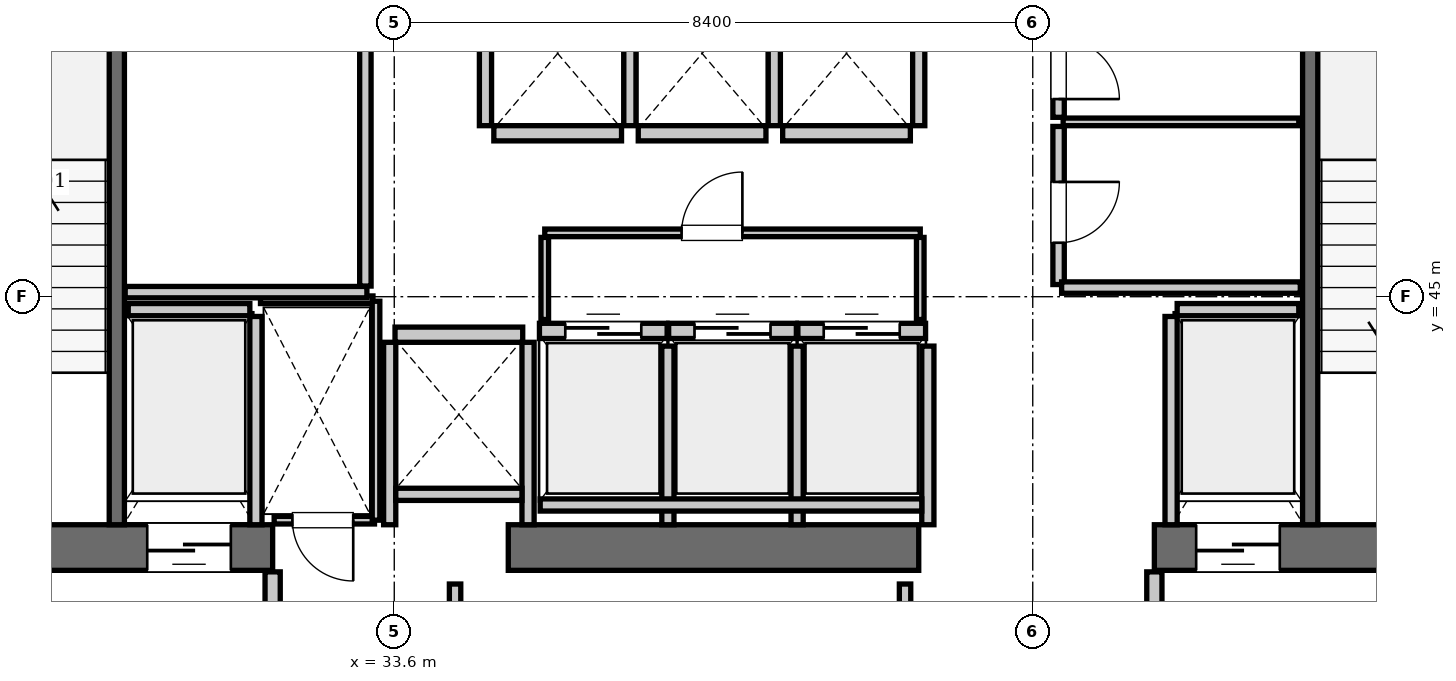
"""IFC4 building model, lengths in metres.
Left out: names, types, materials, properties, quantities, classifications, styles, units other than length and angle.
Written with IfcOpenShell. Run it as: python <this file> out.ifc"""

import sys

from ifc_helpers import new_model, si_unit, direction, frame, frame_2d, origin, place, context, subcontext, project, spatial, rectangle, extrude, element, fill, save


model = new_model("IFC4")
c1 = context("Model", 3, precision=1e-05, world=origin(), true_north=direction((0.0, 1.0)))
c2 = subcontext(c1, "Body", "Model", "MODEL_VIEW")
j1 = project(units=[si_unit("LENGTHUNIT", "METRE"), si_unit("PLANEANGLEUNIT", "RADIAN")], contexts=[c1])
p1 = place(None, origin())
s1 = spatial("IfcSite", under=j1, at=p1, CompositionType="ELEMENT")
p2 = place(p1, origin())
s2 = spatial("IfcBuilding", under=s1, at=p2, CompositionType="ELEMENT")
p3 = place(p2, frame((0.0, 0.0, 304.85)))
s3 = spatial("IfcBuildingStorey", under=s2, at=p3, CompositionType="ELEMENT", Elevation=304.85)
p4 = place(p3, frame((25.2, 41.7, 0.0), z_axis=(0.0, 0.0, 1.0), x_axis=(1.0, 0.0, 0.0)))
e1 = element("IfcWall", 1, at=p4, inside=s3, PredefinedType="SHEAR", context=c2, shape_type="SweptSolid", body=[
    extrude(rectangle(XDim=6.8, YDim=0.6, at=frame_2d((3.4, 0.0))), origin(), (0.0, 0.0, 1.0), 3.85),
])
p5 = place(p4, frame((1.65, 0.0, 0.0)))
e2 = element("IfcOpeningElement", 2, at=p5, cuts=e1, PredefinedType="OPENING", context=c2, shape_type="SweptSolid", body=[
    extrude(rectangle(XDim=1.15, YDim=2.15, at=frame_2d((0.575, 1.075))), frame((0.0, 0.31, 0.0), z_axis=(0.0, -1.0, 0.0), x_axis=(1.0, 0.0, 0.0)), (0.0, 0.0, 1.0), 0.62),
])
p6 = place(p4, frame((5.15, 0.0, 0.0)))
e3 = element("IfcOpeningElement", 3, at=p6, cuts=e1, PredefinedType="OPENING", context=c2, shape_type="SweptSolid", body=[
    extrude(rectangle(XDim=1.1, YDim=2.2, at=frame_2d((0.55, 1.1))), frame((0.0, 0.31, 0.0), z_axis=(0.0, -1.0, 0.0), x_axis=(1.0, 0.0, 0.0)), (0.0, 0.0, 1.0), 0.62),
])
p7 = place(p3, frame((35.1, 41.7, 0.0), z_axis=(0.0, 0.0, 1.0), x_axis=(1.0, 0.0, 0.0)))
e4 = element("IfcWall", 4, at=p7, inside=s3, PredefinedType="SHEAR", context=c2, shape_type="SweptSolid", body=[
    extrude(rectangle(XDim=5.4, YDim=0.6, at=frame_2d((2.7, 0.0))), origin(), (0.0, 0.0, 1.0), 3.85),
])
p8 = place(p3, frame((43.6, 41.7, 0.0), z_axis=(0.0, 0.0, 1.0), x_axis=(1.0, 0.0, 0.0)))
e5 = element("IfcWall", 5, at=p8, inside=s3, PredefinedType="SHEAR", context=c2, shape_type="SweptSolid", body=[
    extrude(rectangle(XDim=6.8, YDim=0.6, at=frame_2d((3.4, 0.0))), origin(), (0.0, 0.0, 1.0), 3.85),
])
p9 = place(p8, frame((3.9, 0.0, 0.0)))
e6 = element("IfcOpeningElement", 6, at=p9, cuts=e5, PredefinedType="OPENING", context=c2, shape_type="SweptSolid", body=[
    extrude(rectangle(XDim=1.15, YDim=2.15, at=frame_2d((0.575, 1.075))), frame((0.0, 0.31, 0.0), z_axis=(0.0, -1.0, 0.0), x_axis=(1.0, 0.0, 0.0)), (0.0, 0.0, 1.0), 0.62),
])
p10 = place(p8, frame((0.55, 0.0, 0.0)))
e7 = element("IfcOpeningElement", 7, at=p10, cuts=e5, PredefinedType="OPENING", context=c2, shape_type="SweptSolid", body=[
    extrude(rectangle(XDim=1.1, YDim=2.2, at=frame_2d((0.55, 1.1))), frame((0.0, 0.31, 0.0), z_axis=(0.0, -1.0, 0.0), x_axis=(1.0, 0.0, 0.0)), (0.0, 0.0, 1.0), 0.62),
])
for number, where, z_axis, x_axis in (
    (8, (29.95, 42.0, 0.0), (0.0, 0.0, 1.0), (0.0, 1.0, 0.0)),
    (9, (45.65, 42.0, 0.0), (0.0, 0.0, 1.0), (0.0, 1.0, 0.0)),
):
    element("IfcWall", number, at=place(p3, frame(where, z_axis=z_axis, x_axis=x_axis)), inside=s3, PredefinedType="SOLIDWALL", context=c2, shape_type="SweptSolid", body=[
        extrude(rectangle(XDim=9.15, YDim=0.2, at=frame_2d((4.575, 0.0))), origin(), (0.0, 0.0, 1.0), 3.61),
    ])
p11 = place(p3, frame((35.51, 44.55, 0.0), z_axis=(0.0, 0.0, 1.0), x_axis=(1.0, 0.0, 0.0)))
e10 = element("IfcWall", 10, at=p11, inside=s3, PredefinedType="SOLIDWALL", context=c2, shape_type="SweptSolid", body=[
    extrude(rectangle(XDim=1.68, YDim=0.2, at=frame_2d((0.84, 0.0))), origin(), (0.0, 0.0, 1.0), 3.61),
])
p12 = place(p11, frame((0.34, 0.0, 0.0)))
e11 = element("IfcOpeningElement", 11, at=p12, cuts=e10, PredefinedType="OPENING", context=c2, shape_type="SweptSolid", body=[
    extrude(rectangle(XDim=1.0, YDim=2.15, at=frame_2d((0.5, 1.075))), frame((0.0, 0.11, 0.0), z_axis=(0.0, -1.0, 0.0), x_axis=(1.0, 0.0, 0.0)), (0.0, 0.0, 1.0), 0.22),
])
p13 = place(p3, frame((37.21, 44.55, 0.0), z_axis=(0.0, 0.0, 1.0), x_axis=(1.0, 0.0, 0.0)))
e12 = element("IfcWall", 12, at=p13, inside=s3, PredefinedType="SOLIDWALL", context=c2, shape_type="SweptSolid", body=[
    extrude(rectangle(XDim=1.68, YDim=0.2, at=frame_2d((0.84, 0.0))), origin(), (0.0, 0.0, 1.0), 3.61),
])
p14 = place(p13, frame((0.34, 0.0, 0.0)))
e13 = element("IfcOpeningElement", 13, at=p14, cuts=e12, PredefinedType="OPENING", context=c2, shape_type="SweptSolid", body=[
    extrude(rectangle(XDim=1.0, YDim=2.15, at=frame_2d((0.5, 1.075))), frame((0.0, 0.11, 0.0), z_axis=(0.0, -1.0, 0.0), x_axis=(1.0, 0.0, 0.0)), (0.0, 0.0, 1.0), 0.22),
])
p15 = place(p3, frame((38.91, 44.55, 0.0), z_axis=(0.0, 0.0, 1.0), x_axis=(1.0, 0.0, 0.0)))
e14 = element("IfcWall", 14, at=p15, inside=s3, PredefinedType="SOLIDWALL", context=c2, shape_type="SweptSolid", body=[
    extrude(rectangle(XDim=1.68, YDim=0.2, at=frame_2d((0.84, 0.0))), origin(), (0.0, 0.0, 1.0), 3.61),
])
p16 = place(p15, frame((0.34, 0.0, 0.0)))
e15 = element("IfcOpeningElement", 15, at=p16, cuts=e14, PredefinedType="OPENING", context=c2, shape_type="SweptSolid", body=[
    extrude(rectangle(XDim=1.0, YDim=2.15, at=frame_2d((0.5, 1.075))), frame((0.0, 0.11, 0.0), z_axis=(0.0, -1.0, 0.0), x_axis=(1.0, 0.0, 0.0)), (0.0, 0.0, 1.0), 0.22),
])
p17 = place(p3, frame((34.91, 47.15, 0.0), z_axis=(0.0, 0.0, 1.0), x_axis=(1.0, 0.0, 0.0)))
e16 = element("IfcWall", 16, at=p17, inside=s3, PredefinedType="SOLIDWALL", context=c2, shape_type="SweptSolid", body=[
    extrude(rectangle(XDim=1.68, YDim=0.2, at=frame_2d((0.84, 0.0))), origin(), (0.0, 0.0, 1.0), 3.61),
])
for number, where, z_axis, x_axis in (
    (17, (36.81, 47.15, 0.0), (0.0, 0.0, 1.0), (1.0, 0.0, 0.0)),
    (18, (38.71, 47.15, 0.0), (0.0, 0.0, 1.0), (1.0, 0.0, 0.0)),
    (19, (33.61, 44.5, 0.0), (0.0, 0.0, 1.0), (1.0, 0.0, 0.0)),
):
    element("IfcWall", number, at=place(p3, frame(where, z_axis=z_axis, x_axis=x_axis)), inside=s3, PredefinedType="SOLIDWALL", context=c2, shape_type="SweptSolid", body=[
        extrude(rectangle(XDim=1.68, YDim=0.2, at=frame_2d((0.84, 0.0))), origin(), (0.0, 0.0, 1.0), 3.61),
    ])
p18 = place(p3, frame((30.1, 44.83, 0.0), z_axis=(0.0, 0.0, 1.0), x_axis=(1.0, 0.0, 0.0)))
e20 = element("IfcWall", 20, at=p18, inside=s3, PredefinedType="SOLIDWALL", context=c2, shape_type="SweptSolid", body=[
    extrude(rectangle(XDim=1.6, YDim=0.16, at=frame_2d((0.8, 0.0))), origin(), (0.0, 0.0, 1.0), 3.61),
])
p19 = place(p3, frame((31.78, 42.0, 0.0), z_axis=(0.0, 0.0, 1.0), x_axis=(0.0, 1.0, 0.0)))
e21 = element("IfcWall", 21, at=p19, inside=s3, PredefinedType="SOLIDWALL", context=c2, shape_type="SweptSolid", body=[
    extrude(rectangle(XDim=2.74, YDim=0.16, at=frame_2d((1.37, 0.0))), origin(), (0.0, 0.0, 1.0), 3.61),
])
p20 = place(p3, frame((43.9, 44.83, 0.0), z_axis=(0.0, 0.0, 1.0), x_axis=(1.0, 0.0, 0.0)))
e22 = element("IfcWall", 22, at=p20, inside=s3, PredefinedType="SOLIDWALL", context=c2, shape_type="SweptSolid", body=[
    extrude(rectangle(XDim=1.6, YDim=0.16, at=frame_2d((0.8, 0.0))), origin(), (0.0, 0.0, 1.0), 3.61),
])
p21 = place(p3, frame((43.82, 42.0, 0.0), z_axis=(0.0, 0.0, 1.0), x_axis=(0.0, 1.0, 0.0)))
e23 = element("IfcWall", 23, at=p21, inside=s3, PredefinedType="SOLIDWALL", context=c2, shape_type="SweptSolid", body=[
    extrude(rectangle(XDim=2.74, YDim=0.16, at=frame_2d((1.37, 0.0))), origin(), (0.0, 0.0, 1.0), 3.61),
])
for number, where, z_axis, x_axis in (
    (24, (37.2, 42.0, 0.0), (0.0, 0.0, 1.0), (0.0, 1.0, 0.0)),
    (25, (38.9, 42.0, 0.0), (0.0, 0.0, 1.0), (0.0, 1.0, 0.0)),
    (26, (40.62, 42.0, 0.0), (0.0, 0.0, 1.0), (0.0, 1.0, 0.0)),
):
    element("IfcWall", number, at=place(p3, frame(where, z_axis=z_axis, x_axis=x_axis)), inside=s3, PredefinedType="SOLIDWALL", context=c2, shape_type="SweptSolid", body=[
        extrude(rectangle(XDim=2.35, YDim=0.16, at=frame_2d((1.175, 0.0))), origin(), (0.0, 0.0, 1.0), 3.61),
    ])
p22 = place(p3, frame((35.52, 42.26, 0.0), z_axis=(0.0, 0.0, 1.0), x_axis=(1.0, 0.0, 0.0)))
e27 = element("IfcWall", 27, at=p22, inside=s3, PredefinedType="SOLIDWALL", context=c2, shape_type="SweptSolid", body=[
    extrude(rectangle(XDim=5.02, YDim=0.16, at=frame_2d((2.51, 0.0))), origin(), (0.0, 0.0, 1.0), 3.61),
])
for number, where, z_axis, x_axis in (
    (28, (34.8, 47.25, 0.0), (0.0, 0.0, 1.0), (0.0, 1.0, 0.0)),
    (29, (36.7, 47.25, 0.0), (0.0, 0.0, 1.0), (0.0, 1.0, 0.0)),
    (30, (38.6, 47.25, 0.0), (0.0, 0.0, 1.0), (0.0, 1.0, 0.0)),
    (31, (40.5, 47.25, 0.0), (0.0, 0.0, 1.0), (0.0, 1.0, 0.0)),
):
    element("IfcWall", number, at=place(p3, frame(where, z_axis=z_axis, x_axis=x_axis)), inside=s3, PredefinedType="SOLIDWALL", context=c2, shape_type="SweptSolid", body=[
        extrude(rectangle(XDim=2.19, YDim=0.16, at=frame_2d((1.095, 0.0))), origin(), (0.0, 0.0, 1.0), 3.61),
    ])
for number, where, z_axis, x_axis in (
    (32, (33.54, 42.0, 0.0), (0.0, 0.0, 1.0), (0.0, 1.0, 0.0)),
    (33, (35.36, 42.0, 0.0), (0.0, 0.0, 1.0), (0.0, 1.0, 0.0)),
):
    element("IfcWall", number, at=place(p3, frame(where, z_axis=z_axis, x_axis=x_axis)), inside=s3, PredefinedType="SOLIDWALL", context=c2, shape_type="SweptSolid", body=[
        extrude(rectangle(XDim=2.4, YDim=0.16, at=frame_2d((1.2, 0.0))), origin(), (0.0, 0.0, 1.0), 3.61),
    ])
p23 = place(p3, frame((33.62, 42.4, 0.0), z_axis=(0.0, 0.0, 1.0), x_axis=(1.0, 0.0, 0.0)))
e34 = element("IfcWall", 34, at=p23, inside=s3, PredefinedType="SOLIDWALL", context=c2, shape_type="SweptSolid", body=[
    extrude(rectangle(XDim=1.66, YDim=0.16, at=frame_2d((0.83, 0.0))), origin(), (0.0, 0.0, 1.0), 3.61),
])
for number, where, z_axis, x_axis in (
    (35, (32.0, 38.31, 0.0), (0.0, 0.0, 1.0), (0.0, 1.0, 0.0)),
    (36, (43.6, 38.31, 0.0), (0.0, 0.0, 1.0), (0.0, 1.0, 0.0)),
):
    element("IfcWall", number, at=place(p3, frame(where, z_axis=z_axis, x_axis=x_axis)), inside=s3, PredefinedType="PARTITIONING", context=c2, shape_type="SweptSolid", body=[
        extrude(rectangle(XDim=3.07, YDim=0.2, at=frame_2d((1.535, 0.0))), origin(), (0.0, 0.0, 1.0), 3.61),
    ])
p24 = place(p3, frame((32.02, 42.06, 0.0), z_axis=(0.0, 0.0, 1.0), x_axis=(1.0, 0.0, 0.0)))
e37 = element("IfcWall", 37, at=p24, inside=s3, PredefinedType="PARTITIONING", context=c2, shape_type="SweptSolid", body=[
    extrude(rectangle(XDim=1.32, YDim=0.1, at=frame_2d((0.66, 0.0))), origin(), (0.0, 0.0, 1.0), 3.61),
])
p25 = place(p24, frame((0.24, 0.0, 0.0)))
e38 = element("IfcOpeningElement", 38, at=p25, cuts=e37, PredefinedType="OPENING", context=c2, shape_type="SweptSolid", body=[
    extrude(rectangle(XDim=0.8, YDim=2.05, at=frame_2d((0.4, 1.025))), frame((0.0, 0.06, 0.0), z_axis=(0.0, -1.0, 0.0), x_axis=(1.0, 0.0, 0.0)), (0.0, 0.0, 1.0), 0.12),
])
p26 = place(p3, frame((31.84, 44.96, 0.0), z_axis=(0.0, 0.0, 1.0), x_axis=(1.0, 0.0, 0.0)))
e39 = element("IfcWall", 39, at=p26, inside=s3, PredefinedType="PARTITIONING", context=c2, shape_type="SweptSolid", body=[
    extrude(rectangle(XDim=1.48, YDim=0.1, at=frame_2d((0.74, 0.0))), origin(), (0.0, 0.0, 1.0), 3.61),
])
p27 = place(p3, frame((33.36, 42.06, 0.0), z_axis=(0.0, 0.0, 1.0), x_axis=(0.0, 1.0, 0.0)))
e40 = element("IfcWall", 40, at=p27, inside=s3, PredefinedType="PARTITIONING", context=c2, shape_type="SweptSolid", body=[
    extrude(rectangle(XDim=2.88, YDim=0.1, at=frame_2d((1.44, 0.0))), origin(), (0.0, 0.0, 1.0), 3.61),
])
p28 = place(p3, frame((35.58, 45.84, 0.0), z_axis=(0.0, 0.0, 1.0), x_axis=(1.0, 0.0, 0.0)))
e41 = element("IfcWall", 41, at=p28, inside=s3, PredefinedType="PARTITIONING", context=c2, shape_type="SweptSolid", body=[
    extrude(rectangle(XDim=4.94, YDim=0.1, at=frame_2d((2.47, 0.0))), origin(), (0.0, 0.0, 1.0), 3.61),
])
p29 = place(p28, frame((1.8, 0.0, 0.0)))
e42 = element("IfcOpeningElement", 42, at=p29, cuts=e41, PredefinedType="OPENING", context=c2, shape_type="SweptSolid", body=[
    extrude(rectangle(XDim=0.8, YDim=2.05, at=frame_2d((0.4, 1.025))), frame((0.0, 0.06, 0.0), z_axis=(0.0, -1.0, 0.0), x_axis=(1.0, 0.0, 0.0)), (0.0, 0.0, 1.0), 0.12),
])
for number, where, z_axis, x_axis in (
    (43, (35.58, 44.7, 0.0), (0.0, 0.0, 1.0), (0.0, 1.0, 0.0)),
    (44, (40.52, 44.7, 0.0), (0.0, 0.0, 1.0), (0.0, 1.0, 0.0)),
):
    element("IfcWall", number, at=place(p3, frame(where, z_axis=z_axis, x_axis=x_axis)), inside=s3, PredefinedType="PARTITIONING", context=c2, shape_type="SweptSolid", body=[
        extrude(rectangle(XDim=1.08, YDim=0.1, at=frame_2d((0.54, 0.0))), origin(), (0.0, 0.0, 1.0), 3.61),
    ])
p30 = place(p3, frame((30.06, 45.06, 0.0), z_axis=(0.0, 0.0, 1.0), x_axis=(1.0, 0.0, 0.0)))
e45 = element("IfcWall", 45, at=p30, inside=s3, PredefinedType="PARTITIONING", context=c2, shape_type="SweptSolid", body=[
    extrude(rectangle(XDim=3.18, YDim=0.15, at=frame_2d((1.59, 0.0))), origin(), (0.0, 0.0, 1.0), 3.61),
])
p31 = place(p3, frame((33.22, 45.14, 0.0), z_axis=(0.0, 0.0, 1.0), x_axis=(0.0, 1.0, 0.0)))
e46 = element("IfcWall", 46, at=p31, inside=s3, PredefinedType="PARTITIONING", context=c2, shape_type="SweptSolid", body=[
    extrude(rectangle(XDim=4.16, YDim=0.15, at=frame_2d((2.08, 0.0))), origin(), (0.0, 0.0, 1.0), 3.61),
])
p32 = place(p3, frame((42.34, 45.16, 0.0), z_axis=(0.0, 0.0, 1.0), x_axis=(0.0, 1.0, 0.0)))
e47 = element("IfcWall", 47, at=p32, inside=s3, PredefinedType="PARTITIONING", context=c2, shape_type="SweptSolid", body=[
    extrude(rectangle(XDim=2.08, YDim=0.15, at=frame_2d((1.04, 0.0))), origin(), (0.0, 0.0, 1.0), 3.61),
])
p33 = place(p32, frame((0.55, 0.0, 0.0)))
e48 = element("IfcOpeningElement", 48, at=p33, cuts=e47, PredefinedType="OPENING", context=c2, shape_type="SweptSolid", body=[
    extrude(rectangle(XDim=0.8, YDim=2.05, at=frame_2d((0.4, 1.025))), frame((0.0, 0.085, 0.0), z_axis=(0.0, -1.0, 0.0), x_axis=(1.0, 0.0, 0.0)), (0.0, 0.0, 1.0), 0.17),
])
p34 = place(p3, frame((42.34, 47.36, 0.0), z_axis=(0.0, 0.0, 1.0), x_axis=(0.0, 1.0, 0.0)))
e49 = element("IfcWall", 49, at=p34, inside=s3, PredefinedType="PARTITIONING", context=c2, shape_type="SweptSolid", body=[
    extrude(rectangle(XDim=2.06, YDim=0.15, at=frame_2d((1.03, 0.0))), origin(), (0.0, 0.0, 1.0), 3.61),
])
p35 = place(p34, frame((0.24, 0.0, 0.0)))
e50 = element("IfcOpeningElement", 50, at=p35, cuts=e49, PredefinedType="OPENING", context=c2, shape_type="SweptSolid", body=[
    extrude(rectangle(XDim=0.8, YDim=2.05, at=frame_2d((0.4, 1.025))), frame((0.0, 0.085, 0.0), z_axis=(0.0, -1.0, 0.0), x_axis=(1.0, 0.0, 0.0)), (0.0, 0.0, 1.0), 0.17),
])
p36 = place(p3, frame((42.4, 47.3, 0.0), z_axis=(0.0, 0.0, 1.0), x_axis=(1.0, 0.0, 0.0)))
e51 = element("IfcWall", 51, at=p36, inside=s3, PredefinedType="PARTITIONING", context=c2, shape_type="SweptSolid", body=[
    extrude(rectangle(XDim=3.1, YDim=0.1, at=frame_2d((1.55, 0.0))), origin(), (0.0, 0.0, 1.0), 3.61),
])
p37 = place(p3, frame((42.38, 45.12, 0.0), z_axis=(0.0, 0.0, 1.0), x_axis=(1.0, 0.0, 0.0)))
e52 = element("IfcWall", 52, at=p37, inside=s3, PredefinedType="PARTITIONING", context=c2, shape_type="SweptSolid", body=[
    extrude(rectangle(XDim=3.14, YDim=0.15, at=frame_2d((1.57, 0.0))), origin(), (0.0, 0.0, 1.0), 3.61),
])
for number, where, z_axis, x_axis in (
    (53, (34.4, 38.38, 0.0), (0.0, 0.0, 1.0), (0.0, 1.0, 0.0)),
    (54, (40.32, 38.38, 0.0), (0.0, 0.0, 1.0), (0.0, 1.0, 0.0)),
):
    element("IfcWall", number, at=place(p3, frame(where, z_axis=z_axis, x_axis=x_axis)), inside=s3, PredefinedType="PARTITIONING", context=c2, shape_type="SweptSolid", body=[
        extrude(rectangle(XDim=2.84, YDim=0.15, at=frame_2d((1.42, 0.0))), origin(), (0.0, 0.0, 1.0), 3.61),
    ])
p38 = place(p12, origin())
e55 = element("IfcDoor", 55, at=p38, inside=s3, OperationType="SLIDING_TO_LEFT", PredefinedType="DOOR", context=c2, shape_type="SweptSolid", body=[
    extrude(rectangle(XDim=1.0, YDim=2.15, at=frame_2d((0.5, 1.075))), frame((0.0, 0.025, 0.0), z_axis=(0.0, -1.0, 0.0), x_axis=(1.0, 0.0, 0.0)), (0.0, 0.0, 1.0), 0.05),
])
fill(e11, e55)
p39 = place(p14, origin())
e56 = element("IfcDoor", 56, at=p39, inside=s3, OperationType="SLIDING_TO_LEFT", PredefinedType="DOOR", context=c2, shape_type="SweptSolid", body=[
    extrude(rectangle(XDim=1.0, YDim=2.15, at=frame_2d((0.5, 1.075))), frame((0.0, 0.025, 0.0), z_axis=(0.0, -1.0, 0.0), x_axis=(1.0, 0.0, 0.0)), (0.0, 0.0, 1.0), 0.05),
])
fill(e13, e56)
p40 = place(p16, origin())
e57 = element("IfcDoor", 57, at=p40, inside=s3, OperationType="SLIDING_TO_LEFT", PredefinedType="DOOR", context=c2, shape_type="SweptSolid", body=[
    extrude(rectangle(XDim=1.0, YDim=2.15, at=frame_2d((0.5, 1.075))), frame((0.0, 0.025, 0.0), z_axis=(0.0, -1.0, 0.0), x_axis=(1.0, 0.0, 0.0)), (0.0, 0.0, 1.0), 0.05),
])
fill(e15, e57)
p41 = place(p6, frame((1.1, 0.0, 0.0), z_axis=(0.0, 0.0, 1.0), x_axis=(-1.0, 0.0, 0.0)))
e58 = element("IfcDoor", 58, at=p41, inside=s3, OperationType="SLIDING_TO_LEFT", PredefinedType="DOOR", context=c2, shape_type="SweptSolid", body=[
    extrude(rectangle(XDim=1.1, YDim=2.2, at=frame_2d((0.55, 1.1))), frame((0.0, 0.025, 0.0), z_axis=(0.0, -1.0, 0.0), x_axis=(1.0, 0.0, 0.0)), (0.0, 0.0, 1.0), 0.05),
])
fill(e3, e58)
p42 = place(p10, frame((1.1, 0.0, 0.0), z_axis=(0.0, 0.0, 1.0), x_axis=(-1.0, 0.0, 0.0)))
e59 = element("IfcDoor", 59, at=p42, inside=s3, OperationType="SLIDING_TO_LEFT", PredefinedType="DOOR", context=c2, shape_type="SweptSolid", body=[
    extrude(rectangle(XDim=1.1, YDim=2.2, at=frame_2d((0.55, 1.1))), frame((0.0, 0.025, 0.0), z_axis=(0.0, -1.0, 0.0), x_axis=(1.0, 0.0, 0.0)), (0.0, 0.0, 1.0), 0.05),
])
fill(e7, e59)
p43 = place(p25, frame((0.8, 0.0, 0.0), z_axis=(0.0, 0.0, 1.0), x_axis=(-1.0, 0.0, 0.0)))
e60 = element("IfcDoor", 60, at=p43, inside=s3, OperationType="SINGLE_SWING_LEFT", PredefinedType="DOOR", context=c2, shape_type="SweptSolid", body=[
    extrude(rectangle(XDim=0.8, YDim=2.05, at=frame_2d((0.4, 1.025))), frame((0.0, 0.025, 0.0), z_axis=(0.0, -1.0, 0.0), x_axis=(1.0, 0.0, 0.0)), (0.0, 0.0, 1.0), 0.05),
])
fill(e38, e60)
p44 = place(p29, origin())
e61 = element("IfcDoor", 61, at=p44, inside=s3, OperationType="SINGLE_SWING_RIGHT", PredefinedType="DOOR", context=c2, shape_type="SweptSolid", body=[
    extrude(rectangle(XDim=0.8, YDim=2.05, at=frame_2d((0.4, 1.025))), frame((0.0, 0.025, 0.0), z_axis=(0.0, -1.0, 0.0), x_axis=(1.0, 0.0, 0.0)), (0.0, 0.0, 1.0), 0.05),
])
fill(e42, e61)
p45 = place(p33, frame((0.8, 0.0, 0.0), z_axis=(0.0, 0.0, 1.0), x_axis=(-1.0, 0.0, 0.0)))
e62 = element("IfcDoor", 62, at=p45, inside=s3, OperationType="SINGLE_SWING_LEFT", PredefinedType="DOOR", context=c2, shape_type="SweptSolid", body=[
    extrude(rectangle(XDim=0.8, YDim=2.05, at=frame_2d((0.4, 1.025))), frame((0.0, 0.025, 0.0), z_axis=(0.0, -1.0, 0.0), x_axis=(1.0, 0.0, 0.0)), (0.0, 0.0, 1.0), 0.05),
])
fill(e48, e62)
p46 = place(p35, frame((0.8, 0.0, 0.0), z_axis=(0.0, 0.0, 1.0), x_axis=(-1.0, 0.0, 0.0)))
e63 = element("IfcDoor", 63, at=p46, inside=s3, OperationType="SINGLE_SWING_RIGHT", PredefinedType="DOOR", context=c2, shape_type="SweptSolid", body=[
    extrude(rectangle(XDim=0.8, YDim=2.05, at=frame_2d((0.4, 1.025))), frame((0.0, 0.025, 0.0), z_axis=(0.0, -1.0, 0.0), x_axis=(1.0, 0.0, 0.0)), (0.0, 0.0, 1.0), 0.05),
])
fill(e50, e63)
save(model, sys.argv[1])
